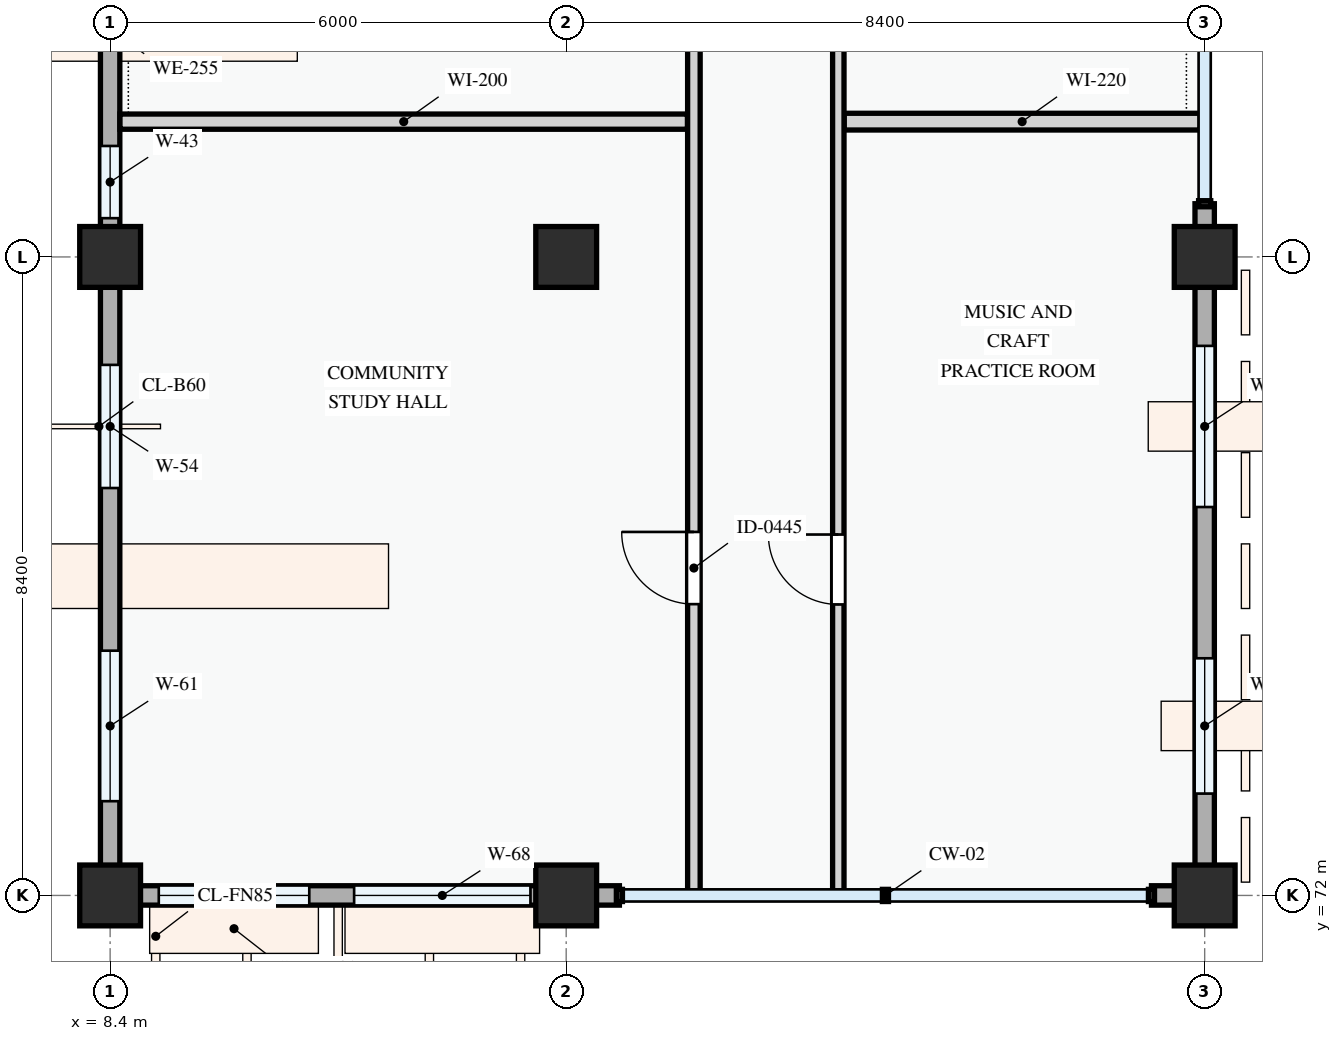
"""IFC4 building model, lengths in metres.
Left out: names, types, materials, properties, quantities, classifications, styles, units other than length and angle.
Written with IfcOpenShell. Run it as: python <this file> out.ifc"""

import sys

from ifc_helpers import new_model, si_unit, direction, frame, frame_2d, origin, origin_2d, place, context, subcontext, project, spatial, rectangle, extrude, element, fill, save


model = new_model("IFC4")
c1 = context("Model", 3, precision=1e-05, world=origin(), true_north=direction((0.0, 1.0)))
c2 = subcontext(c1, "Body", "Model", "MODEL_VIEW")
j1 = project(units=[si_unit("LENGTHUNIT", "METRE"), si_unit("PLANEANGLEUNIT", "RADIAN")], contexts=[c1])
p1 = place(None, origin())
s1 = spatial("IfcSite", under=j1, at=p1, CompositionType="ELEMENT")
p2 = place(p1, origin())
s2 = spatial("IfcBuilding", under=s1, at=p2, CompositionType="ELEMENT")
p3 = place(p2, frame((0.0, 0.0, 4.5)))
s3 = spatial("IfcBuildingStorey", under=s2, at=p3, CompositionType="ELEMENT", Elevation=4.5)
for number, where, z_axis, x_axis in (
    (1, (8.4, 72.0, 0.0), (0.0, 0.0, 1.0), (1.0, 0.0, 0.0)),
    (2, (8.4, 80.4, 0.0), (0.0, 0.0, 1.0), (1.0, 0.0, 0.0)),
    (3, (14.4, 72.0, 0.0), (0.0, 0.0, 1.0), (1.0, 0.0, 0.0)),
    (4, (14.4, 80.4, 0.0), (0.0, 0.0, 1.0), (1.0, 0.0, 0.0)),
    (5, (22.8, 72.0, 0.0), (0.0, 0.0, 1.0), (1.0, 0.0, 0.0)),
    (6, (22.8, 80.4, 0.0), (0.0, 0.0, 1.0), (1.0, 0.0, 0.0)),
):
    element("IfcColumn", number, at=place(p3, frame(where, z_axis=z_axis, x_axis=x_axis)), inside=s3, PredefinedType="COLUMN", context=c2, shape_type="SweptSolid", body=[
        extrude(rectangle(XDim=0.8, YDim=0.8, at=origin_2d()), origin(), (0.0, 0.0, 1.0), 3.6),
    ])
p4 = place(p3, frame((8.4, 86.4, 0.0), z_axis=(0.0, 0.0, 1.0), x_axis=(0.0, -1.0, 0.0)))
e7 = element("IfcWall", 7, at=p4, inside=s3, PredefinedType="STANDARD", context=c2, shape_type="SweptSolid", body=[
    extrude(rectangle(XDim=6.0, YDim=0.255, at=frame_2d((3.0, 0.0))), origin(), (0.0, 0.0, 1.0), 2.875),
])
p5 = place(p4, frame((1.445, 0.0, 0.78)))
e8 = element("IfcOpeningElement", 8, at=p5, cuts=e7, PredefinedType="OPENING", context=c2, shape_type="SweptSolid", body=[
    extrude(rectangle(XDim=1.52, YDim=1.42, at=frame_2d((0.76, 0.71))), frame((0.0, 0.137, 0.0), z_axis=(0.0, -1.0, 0.0), x_axis=(1.0, 0.0, 0.0)), (0.0, 0.0, 1.0), 0.275),
])
p6 = place(p4, frame((4.54, 0.0, 0.78)))
e9 = element("IfcOpeningElement", 9, at=p6, cuts=e7, PredefinedType="OPENING", context=c2, shape_type="SweptSolid", body=[
    extrude(rectangle(XDim=0.95, YDim=1.15, at=frame_2d((0.475, 0.575))), frame((0.0, 0.137, 0.0), z_axis=(0.0, -1.0, 0.0), x_axis=(1.0, 0.0, 0.0)), (0.0, 0.0, 1.0), 0.275),
])
p7 = place(p3, frame((8.4, 80.4, 0.0), z_axis=(0.0, 0.0, 1.0), x_axis=(0.0, -1.0, 0.0)))
e10 = element("IfcWall", 10, at=p7, inside=s3, PredefinedType="STANDARD", context=c2, shape_type="SweptSolid", body=[
    extrude(rectangle(XDim=8.4, YDim=0.255, at=frame_2d((4.2, 0.0))), origin(), (0.0, 0.0, 1.0), 2.725),
])
p8 = place(p7, frame((1.42, 0.0, 0.78)))
e11 = element("IfcOpeningElement", 11, at=p8, cuts=e10, PredefinedType="OPENING", context=c2, shape_type="SweptSolid", body=[
    extrude(rectangle(XDim=1.62, YDim=1.38, at=frame_2d((0.81, 0.69))), frame((0.0, 0.137, 0.0), z_axis=(0.0, -1.0, 0.0), x_axis=(1.0, 0.0, 0.0)), (0.0, 0.0, 1.0), 0.275),
])
p9 = place(p7, frame((5.18, 0.0, 0.78)))
e12 = element("IfcOpeningElement", 12, at=p9, cuts=e10, PredefinedType="OPENING", context=c2, shape_type="SweptSolid", body=[
    extrude(rectangle(XDim=1.98, YDim=1.5, at=frame_2d((0.99, 0.75))), frame((0.0, 0.137, 0.0), z_axis=(0.0, -1.0, 0.0), x_axis=(1.0, 0.0, 0.0)), (0.0, 0.0, 1.0), 0.275),
])
p10 = place(p3, frame((8.4, 72.0, 0.0), z_axis=(0.0, 0.0, 1.0), x_axis=(1.0, 0.0, 0.0)))
e13 = element("IfcWall", 13, at=p10, inside=s3, PredefinedType="STANDARD", context=c2, shape_type="SweptSolid", body=[
    extrude(rectangle(XDim=6.0, YDim=0.255, at=frame_2d((3.0, 0.0))), origin(), (0.0, 0.0, 1.0), 2.775),
])
p11 = place(p10, frame((0.64, 0.0, 0.78)))
e14 = element("IfcOpeningElement", 14, at=p11, cuts=e13, PredefinedType="OPENING", context=c2, shape_type="SweptSolid", body=[
    extrude(rectangle(XDim=1.98, YDim=1.5, at=frame_2d((0.99, 0.75))), frame((0.0, 0.137, 0.0), z_axis=(0.0, -1.0, 0.0), x_axis=(1.0, 0.0, 0.0)), (0.0, 0.0, 1.0), 0.275),
])
p12 = place(p10, frame((3.21, 0.0, 0.78)))
e15 = element("IfcOpeningElement", 15, at=p12, cuts=e13, PredefinedType="OPENING", context=c2, shape_type="SweptSolid", body=[
    extrude(rectangle(XDim=2.32, YDim=1.5, at=frame_2d((1.16, 0.75))), frame((0.0, 0.137, 0.0), z_axis=(0.0, -1.0, 0.0), x_axis=(1.0, 0.0, 0.0)), (0.0, 0.0, 1.0), 0.275),
])
p13 = place(p3, frame((14.4, 72.0, 0.0), z_axis=(0.0, 0.0, 1.0), x_axis=(1.0, 0.0, 0.0)))
e16 = element("IfcWall", 16, at=p13, inside=s3, PredefinedType="STANDARD", context=c2, shape_type="SweptSolid", body=[
    extrude(rectangle(XDim=0.7, YDim=0.255, at=frame_2d((0.35, 0.0))), origin(), (0.0, 0.0, 1.0), 3.34),
])
p14 = place(p3, frame((22.1, 72.0, 0.0), z_axis=(0.0, 0.0, 1.0), x_axis=(1.0, 0.0, 0.0)))
e17 = element("IfcWall", 17, at=p14, inside=s3, PredefinedType="STANDARD", context=c2, shape_type="SweptSolid", body=[
    extrude(rectangle(XDim=0.57, YDim=0.255, at=frame_2d((0.285, 0.0))), origin(), (0.0, 0.0, 1.0), 3.34),
])
p15 = place(p3, frame((22.8, 72.0, 0.0), z_axis=(0.0, 0.0, 1.0), x_axis=(0.0, 1.0, 0.0)))
e18 = element("IfcWall", 18, at=p15, inside=s3, PredefinedType="STANDARD", context=c2, shape_type="SweptSolid", body=[
    extrude(rectangle(XDim=8.4, YDim=0.255, at=frame_2d((4.2, 0.0))), origin(), (0.0, 0.0, 1.0), 2.725),
])
p16 = place(p15, frame((1.34, 0.0, 0.78)))
e19 = element("IfcOpeningElement", 19, at=p16, cuts=e18, PredefinedType="OPENING", context=c2, shape_type="SweptSolid", body=[
    extrude(rectangle(XDim=1.78, YDim=1.42, at=frame_2d((0.89, 0.71))), frame((0.0, 0.137, 0.0), z_axis=(0.0, -1.0, 0.0), x_axis=(1.0, 0.0, 0.0)), (0.0, 0.0, 1.0), 0.275),
])
p17 = place(p15, frame((5.11, 0.0, 0.78)))
e20 = element("IfcOpeningElement", 20, at=p17, cuts=e18, PredefinedType="OPENING", context=c2, shape_type="SweptSolid", body=[
    extrude(rectangle(XDim=2.12, YDim=1.44, at=frame_2d((1.06, 0.72))), frame((0.0, 0.137, 0.0), z_axis=(0.0, -1.0, 0.0), x_axis=(1.0, 0.0, 0.0)), (0.0, 0.0, 1.0), 0.275),
])
p18 = place(p3, frame((22.8, 80.4, 0.0), z_axis=(0.0, 0.0, 1.0), x_axis=(0.0, 1.0, 0.0)))
e21 = element("IfcWall", 21, at=p18, inside=s3, PredefinedType="STANDARD", context=c2, shape_type="SweptSolid", body=[
    extrude(rectangle(XDim=0.7, YDim=0.255, at=frame_2d((0.35, 0.0))), origin(), (0.0, 0.0, 1.0), 3.34),
])
p19 = place(p3, frame((8.53, 82.18, 0.0), z_axis=(0.0, 0.0, 1.0), x_axis=(1.0, 0.0, 0.0)))
e22 = element("IfcWall", 22, at=p19, inside=s3, PredefinedType="PARTITIONING", context=c2, shape_type="SweptSolid", body=[
    extrude(rectangle(XDim=7.466, YDim=0.2, at=frame_2d((3.733, 0.0))), origin(), (0.0, 0.0, 1.0), 3.3),
])
p20 = place(p3, frame((18.057, 82.18, 0.0), z_axis=(0.0, 0.0, 1.0), x_axis=(1.0, 0.0, 0.0)))
e23 = element("IfcWall", 23, at=p20, inside=s3, PredefinedType="PARTITIONING", context=c2, shape_type="SweptSolid", body=[
    extrude(rectangle(XDim=4.683, YDim=0.22, at=frame_2d((2.342, 0.0))), origin(), (0.0, 0.0, 1.0), 3.3),
])
p21 = place(p3, frame((16.08, 72.06, 0.0), z_axis=(0.0, 0.0, 1.0), x_axis=(0.0, 1.0, 0.0)))
e24 = element("IfcWall", 24, at=p21, inside=s3, PredefinedType="PARTITIONING", context=c2, shape_type="SweptSolid", body=[
    extrude(rectangle(XDim=37.28, YDim=0.165, at=frame_2d((18.64, 0.0))), origin(), (0.0, 0.0, 1.0), 3.3),
])
p22 = place(p21, frame((3.772, 0.0, 0.0)))
e25 = element("IfcOpeningElement", 25, at=p22, cuts=e24, PredefinedType="OPENING", context=c2, shape_type="SweptSolid", body=[
    extrude(rectangle(XDim=0.95, YDim=2.1, at=frame_2d((0.475, 1.05))), frame((0.0, 0.093, 0.0), z_axis=(0.0, -1.0, 0.0), x_axis=(1.0, 0.0, 0.0)), (0.0, 0.0, 1.0), 0.185),
])
p23 = place(p21, frame((17.946, 0.0, 0.0)))
e26 = element("IfcOpeningElement", 26, at=p23, cuts=e24, PredefinedType="OPENING", context=c2, shape_type="SweptSolid", body=[
    extrude(rectangle(XDim=0.95, YDim=2.1, at=frame_2d((0.475, 1.05))), frame((0.0, 0.093, 0.0), z_axis=(0.0, -1.0, 0.0), x_axis=(1.0, 0.0, 0.0)), (0.0, 0.0, 1.0), 0.185),
])
p24 = place(p21, frame((25.364, 0.0, 0.0)))
e27 = element("IfcOpeningElement", 27, at=p24, cuts=e24, PredefinedType="OPENING", context=c2, shape_type="SweptSolid", body=[
    extrude(rectangle(XDim=0.95, YDim=2.1, at=frame_2d((0.475, 1.05))), frame((0.0, 0.093, 0.0), z_axis=(0.0, -1.0, 0.0), x_axis=(1.0, 0.0, 0.0)), (0.0, 0.0, 1.0), 0.185),
])
p25 = place(p21, frame((32.402, 0.0, 0.0)))
e28 = element("IfcOpeningElement", 28, at=p25, cuts=e24, PredefinedType="OPENING", context=c2, shape_type="SweptSolid", body=[
    extrude(rectangle(XDim=0.95, YDim=2.1, at=frame_2d((0.475, 1.05))), frame((0.0, 0.093, 0.0), z_axis=(0.0, -1.0, 0.0), x_axis=(1.0, 0.0, 0.0)), (0.0, 0.0, 1.0), 0.185),
])
p26 = place(p3, frame((17.98, 72.06, 0.0), z_axis=(0.0, 0.0, 1.0), x_axis=(0.0, 1.0, 0.0)))
e29 = element("IfcWall", 29, at=p26, inside=s3, PredefinedType="PARTITIONING", context=c2, shape_type="SweptSolid", body=[
    extrude(rectangle(XDim=37.28, YDim=0.15, at=frame_2d((18.64, 0.0))), origin(), (0.0, 0.0, 1.0), 3.3),
])
p27 = place(p26, frame((3.768, 0.0, 0.0)))
e30 = element("IfcOpeningElement", 30, at=p27, cuts=e29, PredefinedType="OPENING", context=c2, shape_type="SweptSolid", body=[
    extrude(rectangle(XDim=0.92, YDim=2.1, at=frame_2d((0.46, 1.05))), frame((0.0, 0.085, 0.0), z_axis=(0.0, -1.0, 0.0), x_axis=(1.0, 0.0, 0.0)), (0.0, 0.0, 1.0), 0.17),
])
p28 = place(p26, frame((18.18, 0.0, 0.0)))
e31 = element("IfcOpeningElement", 31, at=p28, cuts=e29, PredefinedType="OPENING", context=c2, shape_type="SweptSolid", body=[
    extrude(rectangle(XDim=0.96, YDim=2.12, at=frame_2d((0.48, 1.06))), frame((0.0, 0.085, 0.0), z_axis=(0.0, -1.0, 0.0), x_axis=(1.0, 0.0, 0.0)), (0.0, 0.0, 1.0), 0.17),
])
p29 = place(p26, frame((25.358, 0.0, 0.0)))
e32 = element("IfcOpeningElement", 32, at=p29, cuts=e29, PredefinedType="OPENING", context=c2, shape_type="SweptSolid", body=[
    extrude(rectangle(XDim=0.92, YDim=2.1, at=frame_2d((0.46, 1.05))), frame((0.0, 0.085, 0.0), z_axis=(0.0, -1.0, 0.0), x_axis=(1.0, 0.0, 0.0)), (0.0, 0.0, 1.0), 0.17),
])
p30 = place(p26, frame((32.399, 0.0, 0.0)))
e33 = element("IfcOpeningElement", 33, at=p30, cuts=e29, PredefinedType="OPENING", context=c2, shape_type="SweptSolid", body=[
    extrude(rectangle(XDim=0.92, YDim=2.1, at=frame_2d((0.46, 1.05))), frame((0.0, 0.085, 0.0), z_axis=(0.0, -1.0, 0.0), x_axis=(1.0, 0.0, 0.0)), (0.0, 0.0, 1.0), 0.17),
])
p31 = place(p6, origin())
e34 = element("IfcWindow", 34, at=p31, inside=s3, PartitioningType="SINGLE_PANEL", PredefinedType="WINDOW", context=c2, shape_type="SweptSolid", body=[
    extrude(rectangle(XDim=0.95, YDim=1.15, at=frame_2d((0.475, 0.575))), frame((0.0, 0.03, 0.0), z_axis=(0.0, -1.0, 0.0), x_axis=(1.0, 0.0, 0.0)), (0.0, 0.0, 1.0), 0.06),
])
fill(e9, e34)
p32 = place(p8, origin())
e35 = element("IfcWindow", 35, at=p32, inside=s3, PartitioningType="DOUBLE_PANEL_VERTICAL", PredefinedType="WINDOW", context=c2, shape_type="SweptSolid", body=[
    extrude(rectangle(XDim=1.62, YDim=1.38, at=frame_2d((0.81, 0.69))), frame((0.0, 0.03, 0.0), z_axis=(0.0, -1.0, 0.0), x_axis=(1.0, 0.0, 0.0)), (0.0, 0.0, 1.0), 0.06),
])
fill(e11, e35)
p33 = place(p9, origin())
e36 = element("IfcWindow", 36, at=p33, inside=s3, PartitioningType="DOUBLE_PANEL_VERTICAL", PredefinedType="WINDOW", context=c2, shape_type="SweptSolid", body=[
    extrude(rectangle(XDim=1.98, YDim=1.5, at=frame_2d((0.99, 0.75))), frame((0.0, 0.03, 0.0), z_axis=(0.0, -1.0, 0.0), x_axis=(1.0, 0.0, 0.0)), (0.0, 0.0, 1.0), 0.06),
])
fill(e12, e36)
p34 = place(p11, origin())
e37 = element("IfcWindow", 37, at=p34, inside=s3, PartitioningType="DOUBLE_PANEL_VERTICAL", PredefinedType="WINDOW", context=c2, shape_type="SweptSolid", body=[
    extrude(rectangle(XDim=1.98, YDim=1.5, at=frame_2d((0.99, 0.75))), frame((0.0, 0.03, 0.0), z_axis=(0.0, -1.0, 0.0), x_axis=(1.0, 0.0, 0.0)), (0.0, 0.0, 1.0), 0.06),
])
fill(e14, e37)
p35 = place(p12, origin())
e38 = element("IfcWindow", 38, at=p35, inside=s3, PartitioningType="DOUBLE_PANEL_VERTICAL", PredefinedType="WINDOW", context=c2, shape_type="SweptSolid", body=[
    extrude(rectangle(XDim=2.32, YDim=1.5, at=frame_2d((1.16, 0.75))), frame((0.0, 0.03, 0.0), z_axis=(0.0, -1.0, 0.0), x_axis=(1.0, 0.0, 0.0)), (0.0, 0.0, 1.0), 0.06),
])
fill(e15, e38)
p36 = place(p16, origin())
e39 = element("IfcWindow", 39, at=p36, inside=s3, PartitioningType="DOUBLE_PANEL_VERTICAL", PredefinedType="WINDOW", context=c2, shape_type="SweptSolid", body=[
    extrude(rectangle(XDim=1.78, YDim=1.42, at=frame_2d((0.89, 0.71))), frame((0.0, 0.03, 0.0), z_axis=(0.0, -1.0, 0.0), x_axis=(1.0, 0.0, 0.0)), (0.0, 0.0, 1.0), 0.06),
])
fill(e19, e39)
p37 = place(p17, origin())
e40 = element("IfcWindow", 40, at=p37, inside=s3, PartitioningType="DOUBLE_PANEL_VERTICAL", PredefinedType="WINDOW", context=c2, shape_type="SweptSolid", body=[
    extrude(rectangle(XDim=2.12, YDim=1.44, at=frame_2d((1.06, 0.72))), frame((0.0, 0.03, 0.0), z_axis=(0.0, -1.0, 0.0), x_axis=(1.0, 0.0, 0.0)), (0.0, 0.0, 1.0), 0.06),
])
fill(e20, e40)
p38 = place(p22, origin())
e41 = element("IfcDoor", 41, at=p38, inside=s3, OperationType="SINGLE_SWING_RIGHT", PredefinedType="DOOR", context=c2, shape_type="SweptSolid", body=[
    extrude(rectangle(XDim=0.95, YDim=2.1, at=frame_2d((0.475, 1.05))), frame((0.0, 0.025, 0.0), z_axis=(0.0, -1.0, 0.0), x_axis=(1.0, 0.0, 0.0)), (0.0, 0.0, 1.0), 0.05),
])
fill(e25, e41)
p39 = place(p27, origin())
e42 = element("IfcDoor", 42, at=p39, inside=s3, OperationType="SINGLE_SWING_RIGHT", PredefinedType="DOOR", context=c2, shape_type="SweptSolid", body=[
    extrude(rectangle(XDim=0.92, YDim=2.1, at=frame_2d((0.46, 1.05))), frame((0.0, 0.025, 0.0), z_axis=(0.0, -1.0, 0.0), x_axis=(1.0, 0.0, 0.0)), (0.0, 0.0, 1.0), 0.05),
])
fill(e30, e42)
save(model, sys.argv[1])
